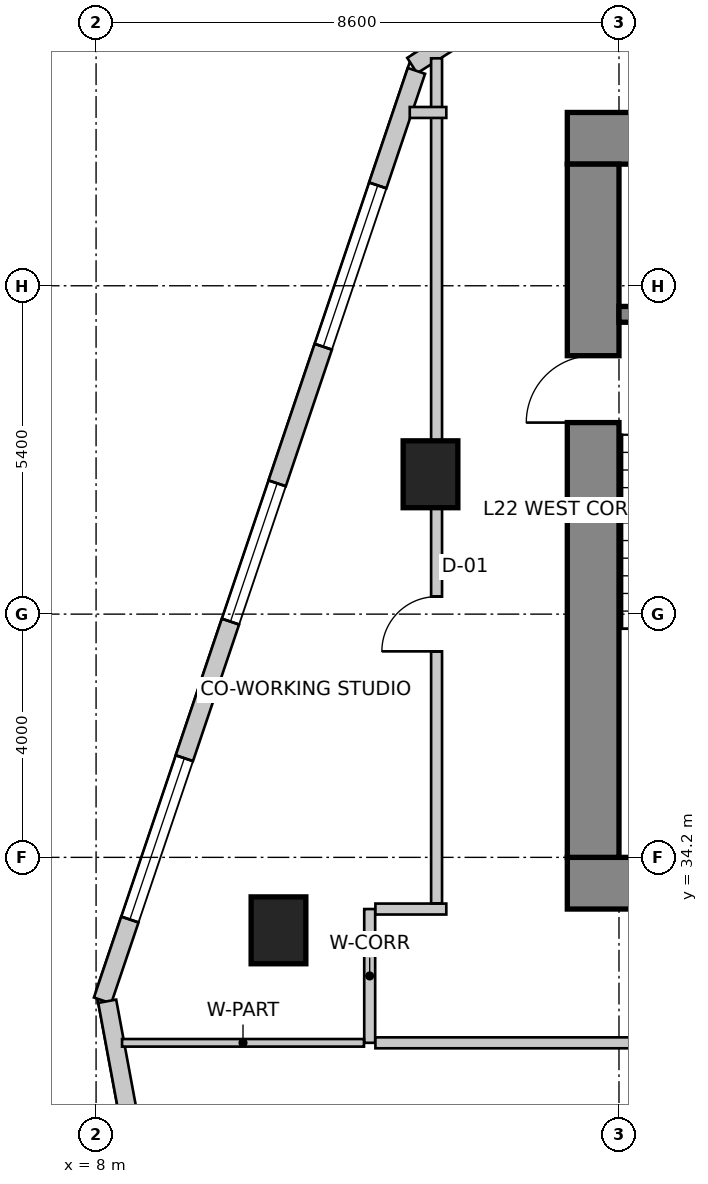
"""IFC4 building model, lengths in metres.
Left out: names, types, materials, properties, quantities, classifications, styles, units other than length and angle.
Written with IfcOpenShell. Run it as: python <this file> out.ifc"""

import sys

from ifc_helpers import new_model, si_unit, direction, frame, frame_2d, origin, origin_2d, place, context, subcontext, project, spatial, rectangle, extrude, source, transform, mapped, element, fill, save


model = new_model("IFC4")
c1 = context("Model", 3, precision=1e-05, world=origin(), true_north=direction((0.0, 1.0)))
c2 = subcontext(c1, "Body", "Model", "MODEL_VIEW")
j1 = project(units=[si_unit("LENGTHUNIT", "METRE"), si_unit("PLANEANGLEUNIT", "RADIAN")], contexts=[c1])
p1 = place(None, origin())
s1 = spatial("IfcSite", under=j1, at=p1, CompositionType="ELEMENT")
p2 = place(p1, origin())
s2 = spatial("IfcBuilding", under=s1, at=p2, CompositionType="ELEMENT")
p3 = place(p2, frame((0.0, 0.0, 91.0)))
s3 = spatial("IfcBuildingStorey", under=s2, at=p3, CompositionType="ELEMENT", Elevation=91.0)
p4 = place(p3, frame((15.75, 46.025, 0.0), z_axis=(0.0, 0.0, 1.0), x_axis=(1.0, 0.0, 0.0)))
e1 = element("IfcWall", 1, at=p4, inside=s3, PredefinedType="SHEAR", context=c2, shape_type="SweptSolid", body=[
    extrude(rectangle(XDim=16.1, YDim=0.85, at=frame_2d((8.05, 0.0))), origin(), (0.0, 0.0, 1.0), 4.0),
])
p5 = place(p3, frame((15.75, 33.775, 0.0), z_axis=(0.0, 0.0, 1.0), x_axis=(1.0, 0.0, 0.0)))
e2 = element("IfcWall", 2, at=p5, inside=s3, PredefinedType="SHEAR", context=c2, shape_type="SweptSolid", body=[
    extrude(rectangle(XDim=16.1, YDim=0.85, at=frame_2d((8.05, 0.0))), origin(), (0.0, 0.0, 1.0), 4.0),
])
m1 = source(origin(), c2, "Body", "SweptSolid", [
    extrude(rectangle(XDim=1.3, YDim=2.15, at=frame_2d((0.65, 1.075))), frame((0.0, 0.435, 0.0), z_axis=(0.0, -1.0, 0.0), x_axis=(1.0, 0.0, 0.0)), (0.0, 0.0, 1.0), 0.87),
])
p6 = place(p5, frame((10.18, 0.0, 0.0)))
e3 = element("IfcOpeningElement", 3, at=p6, cuts=e2, PredefinedType="OPENING", context=c2, shape_type="MappedRepresentation", body=[
    mapped(m1, transform((0.0, 0.0, 0.0), scale=1.0)),
])
p7 = place(p3, frame((16.175, 34.2, 0.0), z_axis=(0.0, 0.0, 1.0), x_axis=(0.0, 1.0, 0.0)))
e4 = element("IfcWall", 4, at=p7, inside=s3, PredefinedType="SHEAR", context=c2, shape_type="SweptSolid", body=[
    extrude(rectangle(XDim=11.4, YDim=0.85, at=frame_2d((5.7, 0.0))), origin(), (0.0, 0.0, 1.0), 4.0),
])
m2 = source(origin(), c2, "Body", "SweptSolid", [
    extrude(rectangle(XDim=1.1, YDim=2.15, at=frame_2d((0.55, 1.075))), frame((0.0, 0.435, 0.0), z_axis=(0.0, -1.0, 0.0), x_axis=(1.0, 0.0, 0.0)), (0.0, 0.0, 1.0), 0.87),
])
p8 = place(p7, frame((7.15, 0.0, 0.0)))
e5 = element("IfcOpeningElement", 5, at=p8, cuts=e4, PredefinedType="OPENING", context=c2, shape_type="MappedRepresentation", body=[
    mapped(m2, transform((0.0, 0.0, 0.0), scale=1.0)),
])
p9 = place(p3, frame((16.6, 43.13, 0.0), z_axis=(0.0, 0.0, 1.0), x_axis=(1.0, 0.0, 0.0)))
e6 = element("IfcWall", 6, at=p9, inside=s3, PredefinedType="SHEAR", context=c2, shape_type="SweptSolid", body=[
    extrude(rectangle(XDim=3.5, YDim=0.26, at=frame_2d((1.75, 0.0))), origin(), (0.0, 0.0, 1.0), 4.0),
])
m3 = source(origin(), c2, "Body", "SweptSolid", [
    extrude(rectangle(XDim=0.9, YDim=1.1, at=origin_2d()), origin(), (0.0, 0.0, 1.0), 4.0),
])
for number, where, z_axis, x_axis in (
    (7, (11.0, 33.0, 0.0), (0.0, 0.0, 1.0), (1.0, 0.0, 0.0)),
    (8, (13.5, 40.5, 0.0), (0.0, 0.0, 1.0), (1.0, 0.0, 0.0)),
):
    element("IfcColumn", number, at=place(p3, frame(where, z_axis=z_axis, x_axis=x_axis)), inside=s3, PredefinedType="COLUMN", context=c2, shape_type="MappedRepresentation", body=[
        mapped(m3, transform((0.0, 0.0, 0.0), scale=1.0)),
    ])
p10 = place(p3, frame((21.875, 52.742, 0.0), z_axis=(0.0, 0.0, 1.0), x_axis=(-0.843662465249, -0.536873956092, 0.0)))
e9 = element("IfcWall", 9, at=p10, inside=s3, PredefinedType="SOLIDWALL", context=c2, shape_type="SweptSolid", body=[
    extrude(rectangle(XDim=10.284, YDim=0.3, at=frame_2d((5.142, 0.0))), origin(), (0.0, 0.0, 1.0), 3.75),
])
m4 = source(origin(), c2, "Body", "SweptSolid", [
    extrude(rectangle(XDim=0.9, YDim=1.6, at=frame_2d((0.45, 0.8))), frame((0.0, 0.16, 0.0), z_axis=(0.0, -1.0, 0.0), x_axis=(1.0, 0.0, 0.0)), (0.0, 0.0, 1.0), 0.32),
])
p11 = place(p10, frame((0.629, 0.0, 0.85)))
e10 = element("IfcOpeningElement", 10, at=p11, cuts=e9, PredefinedType="OPENING", context=c2, shape_type="MappedRepresentation", body=[
    mapped(m4, transform((0.0, 0.0, 0.0), scale=1.0)),
])
m5 = source(origin(), c2, "Body", "SweptSolid", [
    extrude(rectangle(XDim=2.4, YDim=2.2, at=frame_2d((1.2, 1.1))), frame((0.0, 0.16, 0.0), z_axis=(0.0, -1.0, 0.0), x_axis=(1.0, 0.0, 0.0)), (0.0, 0.0, 1.0), 0.32),
])
p12 = place(p10, frame((3.542, 0.0, 0.85)))
e11 = element("IfcOpeningElement", 11, at=p12, cuts=e9, PredefinedType="OPENING", context=c2, shape_type="MappedRepresentation", body=[
    mapped(m5, transform((0.0, 0.0, 0.0), scale=1.0)),
])
m6 = source(origin(), c2, "Body", "SweptSolid", [
    extrude(rectangle(XDim=1.5, YDim=1.8, at=frame_2d((0.75, 0.9))), frame((0.0, 0.16, 0.0), z_axis=(0.0, -1.0, 0.0), x_axis=(1.0, 0.0, 0.0)), (0.0, 0.0, 1.0), 0.32),
])
p13 = place(p10, frame((7.903, 0.0, 0.85)))
e12 = element("IfcOpeningElement", 12, at=p13, cuts=e9, PredefinedType="OPENING", context=c2, shape_type="MappedRepresentation", body=[
    mapped(m6, transform((0.0, 0.0, 0.0), scale=1.0)),
])
p14 = place(p3, frame((13.269, 47.134, 0.0), z_axis=(0.0, 0.0, 1.0), x_axis=(-0.319920423265, -0.947444416722, 0.0)))
e13 = element("IfcWall", 13, at=p14, inside=s3, PredefinedType="SOLIDWALL", context=c2, shape_type="SweptSolid", body=[
    extrude(rectangle(XDim=16.135, YDim=0.3, at=frame_2d((8.067, 0.0))), origin(), (0.0, 0.0, 1.0), 3.75),
])
m7 = source(origin(), c2, "Body", "SweptSolid", [
    extrude(rectangle(XDim=2.8, YDim=2.4, at=frame_2d((1.4, 1.2))), frame((0.0, 0.16, 0.0), z_axis=(0.0, -1.0, 0.0), x_axis=(1.0, 0.0, 0.0)), (0.0, 0.0, 1.0), 0.32),
])
p15 = place(p14, frame((1.988, 0.0, 0.85)))
e14 = element("IfcOpeningElement", 14, at=p15, cuts=e13, PredefinedType="OPENING", context=c2, shape_type="MappedRepresentation", body=[
    mapped(m7, transform((0.0, 0.0, 0.0), scale=1.0)),
])
p16 = place(p14, frame((7.159, 0.0, 0.85)))
e15 = element("IfcOpeningElement", 15, at=p16, cuts=e13, PredefinedType="OPENING", context=c2, shape_type="MappedRepresentation", body=[
    mapped(m5, transform((0.0, 0.0, 0.0), scale=1.0)),
])
p17 = place(p14, frame((11.93, 0.0, 0.85)))
e16 = element("IfcOpeningElement", 16, at=p17, cuts=e13, PredefinedType="OPENING", context=c2, shape_type="MappedRepresentation", body=[
    mapped(m7, transform((0.0, 0.0, 0.0), scale=1.0)),
])
p18 = place(p3, frame((8.183, 31.833, 0.0), z_axis=(0.0, 0.0, 1.0), x_axis=(0.18216364648, -0.983268226834, 0.0)))
e17 = element("IfcWall", 17, at=p18, inside=s3, PredefinedType="SOLIDWALL", context=c2, shape_type="SweptSolid", body=[
    extrude(rectangle(XDim=26.678, YDim=0.3, at=frame_2d((13.339, 0.0))), origin(), (0.0, 0.0, 1.0), 3.75),
])
p19 = place(p18, frame((3.152, 0.0, 0.85)))
e18 = element("IfcOpeningElement", 18, at=p19, cuts=e17, PredefinedType="OPENING", context=c2, shape_type="MappedRepresentation", body=[
    mapped(m5, transform((0.0, 0.0, 0.0), scale=1.0)),
])
p20 = place(p18, frame((9.076, 0.0, 0.85)))
e19 = element("IfcOpeningElement", 19, at=p20, cuts=e17, PredefinedType="OPENING", context=c2, shape_type="MappedRepresentation", body=[
    mapped(m5, transform((0.0, 0.0, 0.0), scale=1.0)),
])
p21 = place(p18, frame((13.847, 0.0, 0.85)))
e20 = element("IfcOpeningElement", 20, at=p21, cuts=e17, PredefinedType="OPENING", context=c2, shape_type="MappedRepresentation", body=[
    mapped(m5, transform((0.0, 0.0, 0.0), scale=1.0)),
])
p22 = place(p18, frame((18.172, 0.0, 0.85)))
e21 = element("IfcOpeningElement", 21, at=p22, cuts=e17, PredefinedType="OPENING", context=c2, shape_type="MappedRepresentation", body=[
    mapped(m7, transform((0.0, 0.0, 0.0), scale=1.0)),
])
p23 = place(p18, frame((22.896, 0.0, 0.85)))
e22 = element("IfcOpeningElement", 22, at=p23, cuts=e17, PredefinedType="OPENING", context=c2, shape_type="MappedRepresentation", body=[
    mapped(m5, transform((0.0, 0.0, 0.0), scale=1.0)),
])
p24 = place(p3, frame((12.5, 31.15, 0.0), z_axis=(0.0, 0.0, 1.0), x_axis=(0.0, 1.0, 0.0)))
e23 = element("IfcWall", 23, at=p24, inside=s3, PredefinedType="PARTITIONING", context=c2, shape_type="SweptSolid", body=[
    extrude(rectangle(XDim=2.2, YDim=0.18, at=frame_2d((1.1, 0.0))), origin(), (0.0, 0.0, 1.0), 3.419),
])
p25 = place(p3, frame((12.594, 33.35, 0.0), z_axis=(0.0, 0.0, 1.0), x_axis=(1.0, 0.0, 0.0)))
e24 = element("IfcWall", 24, at=p25, inside=s3, PredefinedType="PARTITIONING", context=c2, shape_type="SweptSolid", body=[
    extrude(rectangle(XDim=1.166, YDim=0.18, at=frame_2d((0.583, 0.0))), origin(), (0.0, 0.0, 1.0), 3.75),
])
p26 = place(p3, frame((17.96, 31.15, 0.0), z_axis=(0.0, 0.0, 1.0), x_axis=(-1.0, 0.0, 0.0)))
e25 = element("IfcWall", 25, at=p26, inside=s3, PredefinedType="PARTITIONING", context=c2, shape_type="SweptSolid", body=[
    extrude(rectangle(XDim=5.366, YDim=0.18, at=frame_2d((2.683, 0.0))), origin(), (0.0, 0.0, 1.0), 3.419),
])
p27 = place(p3, frame((13.6, 33.444, 0.0), z_axis=(0.0, 0.0, 1.0), x_axis=(0.0, 1.0, 0.0)))
e26 = element("IfcWall", 26, at=p27, inside=s3, PredefinedType="PARTITIONING", context=c2, shape_type="SweptSolid", body=[
    extrude(rectangle(XDim=13.896, YDim=0.18, at=frame_2d((6.948, 0.0))), origin(), (0.0, 0.0, 1.0), 2.892),
])
m8 = source(origin(), c2, "Body", "SweptSolid", [
    extrude(rectangle(XDim=0.9, YDim=2.15, at=frame_2d((0.45, 1.075))), frame((0.0, 0.1, 0.0), z_axis=(0.0, -1.0, 0.0), x_axis=(1.0, 0.0, 0.0)), (0.0, 0.0, 1.0), 0.2),
])
p28 = place(p27, frame((4.144, 0.0, 0.0)))
e27 = element("IfcOpeningElement", 27, at=p28, cuts=e26, PredefinedType="OPENING", context=c2, shape_type="MappedRepresentation", body=[
    mapped(m8, transform((0.0, 0.0, 0.0), scale=1.0)),
])
p29 = place(p3, frame((13.76, 46.45, 0.0), z_axis=(0.0, 0.0, 1.0), x_axis=(-1.0, 0.0, 0.0)))
e28 = element("IfcWall", 28, at=p29, inside=s3, PredefinedType="PARTITIONING", context=c2, shape_type="SweptSolid", body=[
    extrude(rectangle(XDim=0.601, YDim=0.18, at=frame_2d((0.301, 0.0))), origin(), (0.0, 0.0, 1.0), 3.75),
])
p30 = place(p3, frame((12.406, 31.15, 0.0), z_axis=(0.0, 0.0, 1.0), x_axis=(-1.0, 0.0, 0.0)))
e29 = element("IfcWall", 29, at=p30, inside=s3, PredefinedType="PARTITIONING", context=c2, shape_type="SweptSolid", body=[
    extrude(rectangle(XDim=3.979, YDim=0.125, at=frame_2d((1.99, 0.0))), origin(), (0.0, 0.0, 1.0), 2.892),
])
m9 = source(origin(), c2, "Body", "SweptSolid", [
    extrude(rectangle(XDim=2.8, YDim=2.4, at=frame_2d((1.4, 1.2))), frame((0.0, -0.015, 0.0), z_axis=(0.0, -1.0, 0.0), x_axis=(1.0, 0.0, 0.0)), (0.0, 0.0, 1.0), 0.06),
])
p31 = place(p15, origin())
e30 = element("IfcWindow", 30, at=p31, inside=s3, PartitioningType="SINGLE_PANEL", PredefinedType="WINDOW", context=c2, shape_type="MappedRepresentation", body=[
    mapped(m9, transform((0.0, 0.0, 0.0), scale=1.0)),
])
fill(e14, e30)
m10 = source(origin(), c2, "Body", "SweptSolid", [
    extrude(rectangle(XDim=2.4, YDim=2.2, at=frame_2d((1.2, 1.1))), frame((0.0, -0.015, 0.0), z_axis=(0.0, -1.0, 0.0), x_axis=(1.0, 0.0, 0.0)), (0.0, 0.0, 1.0), 0.06),
])
p32 = place(p16, origin())
e31 = element("IfcWindow", 31, at=p32, inside=s3, PartitioningType="SINGLE_PANEL", PredefinedType="WINDOW", context=c2, shape_type="MappedRepresentation", body=[
    mapped(m10, transform((0.0, 0.0, 0.0), scale=1.0)),
])
fill(e15, e31)
p33 = place(p17, origin())
e32 = element("IfcWindow", 32, at=p33, inside=s3, PartitioningType="SINGLE_PANEL", PredefinedType="WINDOW", context=c2, shape_type="MappedRepresentation", body=[
    mapped(m9, transform((0.0, 0.0, 0.0), scale=1.0)),
])
fill(e16, e32)
m11 = source(origin(), c2, "Body", "SweptSolid", [
    extrude(rectangle(XDim=1.1, YDim=2.15, at=frame_2d((0.55, 1.075))), frame((0.0, 0.025, 0.0), z_axis=(0.0, -1.0, 0.0), x_axis=(1.0, 0.0, 0.0)), (0.0, 0.0, 1.0), 0.05),
])
p34 = place(p8, origin())
e33 = element("IfcDoor", 33, at=p34, inside=s3, OperationType="SINGLE_SWING_LEFT", PredefinedType="DOOR", context=c2, shape_type="MappedRepresentation", body=[
    mapped(m11, transform((0.0, 0.0, 0.0), scale=1.0)),
])
fill(e5, e33)
m12 = source(origin(), c2, "Body", "SweptSolid", [
    extrude(rectangle(XDim=0.9, YDim=2.15, at=frame_2d((0.45, 1.075))), frame((0.0, 0.025, 0.0), z_axis=(0.0, -1.0, 0.0), x_axis=(1.0, 0.0, 0.0)), (0.0, 0.0, 1.0), 0.05),
])
p35 = place(p28, origin())
e34 = element("IfcDoor", 34, at=p35, inside=s3, OperationType="SINGLE_SWING_LEFT", PredefinedType="DOOR", context=c2, shape_type="MappedRepresentation", body=[
    mapped(m12, transform((0.0, 0.0, 0.0), scale=1.0)),
])
fill(e27, e34)
save(model, sys.argv[1])
